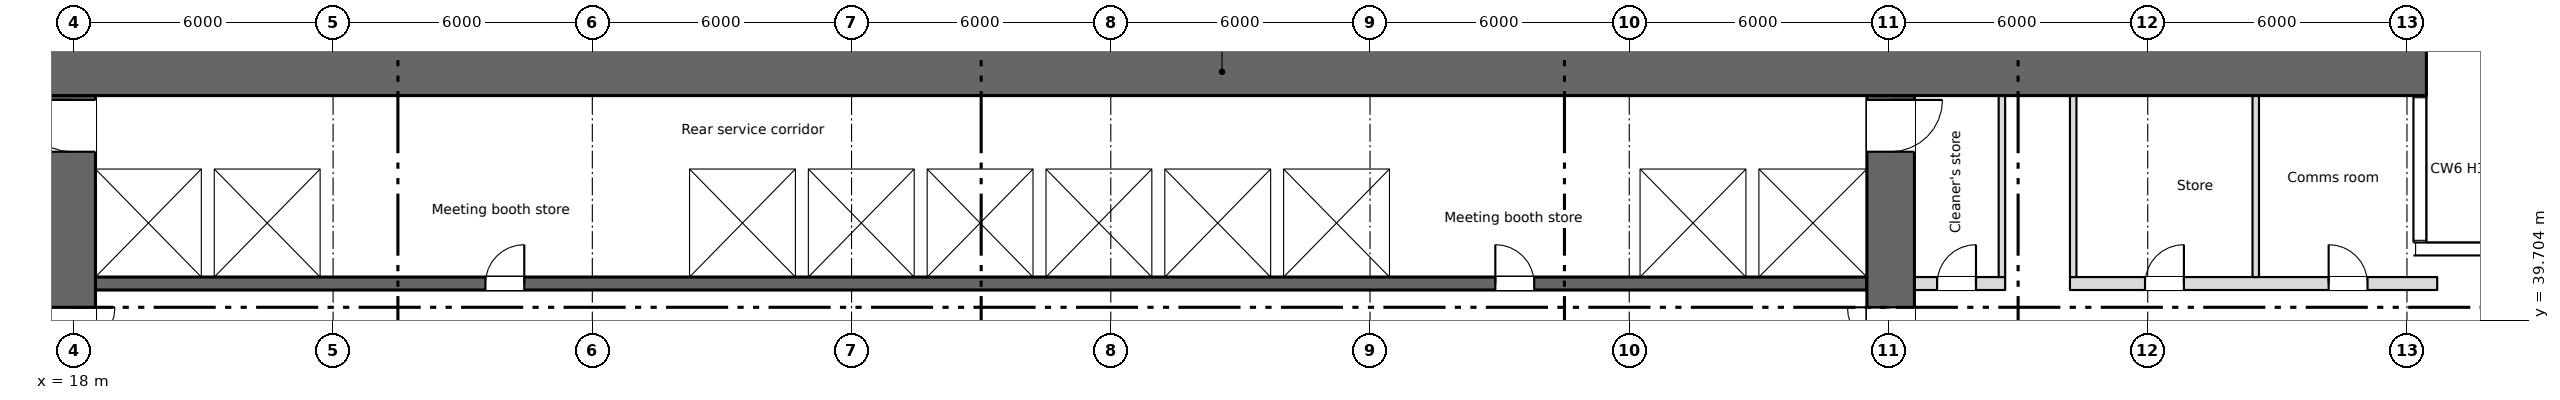
"""IFC4 building model, lengths in metres.
Left out: names, types, materials, properties, quantities, classifications, styles, units other than length and angle.
Written with IfcOpenShell. Run it as: python <this file> out.ifc"""

import sys

from ifc_helpers import new_model, si_unit, direction, frame, frame_2d, origin, place, context, subcontext, project, spatial, rectangle, extrude, element, fill, save


model = new_model("IFC4")
c1 = context("Model", 3, precision=1e-05, world=origin(), true_north=direction((0.0, 1.0)))
c2 = subcontext(c1, "Body", "Model", "MODEL_VIEW")
j1 = project(units=[si_unit("LENGTHUNIT", "METRE"), si_unit("PLANEANGLEUNIT", "RADIAN")], contexts=[c1])
p1 = place(None, origin())
s1 = spatial("IfcSite", under=j1, at=p1, CompositionType="ELEMENT")
p2 = place(p1, origin())
s2 = spatial("IfcBuilding", under=s1, at=p2, CompositionType="ELEMENT")
p3 = place(p2, frame((0.0, 0.0, 17.9)))
s3 = spatial("IfcBuildingStorey", under=s2, at=p3, CompositionType="ELEMENT", Elevation=17.9)
p4 = place(p3, frame((5.55, 45.45, 0.0), z_axis=(0.0, 0.0, 1.0), x_axis=(1.0, 0.0, 0.0)))
e1 = element("IfcWall", 1, at=p4, inside=s3, PredefinedType="SHEAR", context=c2, shape_type="SweptSolid", body=[
    extrude(rectangle(XDim=66.9, YDim=1.1, at=frame_2d((33.45, 0.0))), origin(), (0.0, 0.0, 1.0), 3.8),
])
p5 = place(p4, frame((1.2, 0.0, 0.6)))
e2 = element("IfcOpeningElement", 2, at=p5, cuts=e1, PredefinedType="OPENING", context=c2, shape_type="SweptSolid", body=[
    extrude(rectangle(XDim=0.6, YDim=2.7, at=frame_2d((0.3, 1.35))), frame((0.0, 0.56, 0.0), z_axis=(0.0, -1.0, 0.0), x_axis=(1.0, 0.0, 0.0)), (0.0, 0.0, 1.0), 1.12),
])
p6 = place(p4, frame((7.2, 0.0, 0.6)))
e3 = element("IfcOpeningElement", 3, at=p6, cuts=e1, PredefinedType="OPENING", context=c2, shape_type="SweptSolid", body=[
    extrude(rectangle(XDim=0.6, YDim=2.7, at=frame_2d((0.3, 1.35))), frame((0.0, 0.56, 0.0), z_axis=(0.0, -1.0, 0.0), x_axis=(1.0, 0.0, 0.0)), (0.0, 0.0, 1.0), 1.12),
])
p7 = place(p3, frame((72.85, 28.4, 0.0), z_axis=(0.0, 0.0, 1.0), x_axis=(0.0, 1.0, 0.0)))
e4 = element("IfcWall", 4, at=p7, inside=s3, PredefinedType="SHEAR", context=c2, shape_type="SweptSolid", body=[
    extrude(rectangle(XDim=12.85, YDim=0.3, at=frame_2d((6.425, 0.0))), origin(), (0.0, 0.0, 1.0), 3.8),
])
p8 = place(p3, frame((17.95, 28.4, 0.0), z_axis=(0.0, 0.0, 1.0), x_axis=(0.0, 1.0, 0.0)))
e5 = element("IfcWall", 5, at=p8, inside=s3, PredefinedType="SHEAR", context=c2, shape_type="SweptSolid", body=[
    extrude(rectangle(XDim=16.5, YDim=1.1, at=frame_2d((8.25, 0.0))), origin(), (0.0, 0.0, 1.0), 3.8),
])
p9 = place(p8, frame((9.6, 0.0, 0.0)))
e6 = element("IfcOpeningElement", 6, at=p9, cuts=e5, PredefinedType="OPENING", context=c2, shape_type="SweptSolid", body=[
    extrude(rectangle(XDim=2.0, YDim=2.1, at=frame_2d((1.0, 1.05))), frame((0.0, 0.56, 0.0), z_axis=(0.0, -1.0, 0.0), x_axis=(1.0, 0.0, 0.0)), (0.0, 0.0, 1.0), 1.12),
])
p10 = place(p8, frame((15.2, 0.0, 0.0)))
e7 = element("IfcOpeningElement", 7, at=p10, cuts=e5, PredefinedType="OPENING", context=c2, shape_type="SweptSolid", body=[
    extrude(rectangle(XDim=1.2, YDim=2.1, at=frame_2d((0.6, 1.05))), frame((0.0, 0.56, 0.0), z_axis=(0.0, -1.0, 0.0), x_axis=(1.0, 0.0, 0.0)), (0.0, 0.0, 1.0), 1.12),
])
p11 = place(p3, frame((60.05, 28.4, 0.0), z_axis=(0.0, 0.0, 1.0), x_axis=(0.0, 1.0, 0.0)))
e8 = element("IfcWall", 8, at=p11, inside=s3, PredefinedType="SHEAR", context=c2, shape_type="SweptSolid", body=[
    extrude(rectangle(XDim=16.5, YDim=1.1, at=frame_2d((8.25, 0.0))), origin(), (0.0, 0.0, 1.0), 3.8),
])
p12 = place(p11, frame((9.6, 0.0, 0.0)))
e9 = element("IfcOpeningElement", 9, at=p12, cuts=e8, PredefinedType="OPENING", context=c2, shape_type="SweptSolid", body=[
    extrude(rectangle(XDim=2.0, YDim=2.1, at=frame_2d((1.0, 1.05))), frame((0.0, 0.56, 0.0), z_axis=(0.0, -1.0, 0.0), x_axis=(1.0, 0.0, 0.0)), (0.0, 0.0, 1.0), 1.12),
])
p13 = place(p11, frame((15.2, 0.0, 0.0)))
e10 = element("IfcOpeningElement", 10, at=p13, cuts=e8, PredefinedType="OPENING", context=c2, shape_type="SweptSolid", body=[
    extrude(rectangle(XDim=1.2, YDim=2.1, at=frame_2d((0.6, 1.05))), frame((0.0, 0.56, 0.0), z_axis=(0.0, -1.0, 0.0), x_axis=(1.0, 0.0, 0.0)), (0.0, 0.0, 1.0), 1.12),
])
p14 = place(p3, frame((18.5, 40.55, 0.0), z_axis=(0.0, 0.0, 1.0), x_axis=(1.0, 0.0, 0.0)))
e11 = element("IfcWall", 11, at=p14, inside=s3, PredefinedType="SHEAR", context=c2, shape_type="SweptSolid", body=[
    extrude(rectangle(XDim=41.0, YDim=0.3, at=frame_2d((20.5, 0.0))), origin(), (0.0, 0.0, 1.0), 3.8),
])
p15 = place(p14, frame((9.025, 0.0, 0.0)))
e12 = element("IfcOpeningElement", 12, at=p15, cuts=e11, PredefinedType="OPENING", context=c2, shape_type="SweptSolid", body=[
    extrude(rectangle(XDim=0.9, YDim=2.1, at=frame_2d((0.45, 1.05))), frame((0.0, 0.16, 0.0), z_axis=(0.0, -1.0, 0.0), x_axis=(1.0, 0.0, 0.0)), (0.0, 0.0, 1.0), 0.32),
])
p16 = place(p14, frame((32.4, 0.0, 0.0)))
e13 = element("IfcOpeningElement", 13, at=p16, cuts=e11, PredefinedType="OPENING", context=c2, shape_type="SweptSolid", body=[
    extrude(rectangle(XDim=0.9, YDim=2.1, at=frame_2d((0.45, 1.05))), frame((0.0, 0.16, 0.0), z_axis=(0.0, -1.0, 0.0), x_axis=(1.0, 0.0, 0.0)), (0.0, 0.0, 1.0), 0.32),
])
p17 = place(p14, frame((14.425, 0.0, 0.0)))
e14 = element("IfcOpeningElement", 14, at=p17, cuts=e11, PredefinedType="OPENING", context=c2, shape_type="SweptSolid", body=[
    extrude(rectangle(XDim=1.1, YDim=2.1, at=frame_2d((0.55, 1.05))), frame((0.0, 0.16, 0.0), z_axis=(0.0, -1.0, 0.0), x_axis=(1.0, 0.0, 0.0)), (0.0, 0.0, 1.0), 0.32),
])
p18 = place(p14, frame((17.175, 0.0, 0.0)))
e15 = element("IfcOpeningElement", 15, at=p18, cuts=e11, PredefinedType="OPENING", context=c2, shape_type="SweptSolid", body=[
    extrude(rectangle(XDim=1.1, YDim=2.1, at=frame_2d((0.55, 1.05))), frame((0.0, 0.16, 0.0), z_axis=(0.0, -1.0, 0.0), x_axis=(1.0, 0.0, 0.0)), (0.0, 0.0, 1.0), 0.32),
])
p19 = place(p14, frame((19.925, 0.0, 0.0)))
e16 = element("IfcOpeningElement", 16, at=p19, cuts=e11, PredefinedType="OPENING", context=c2, shape_type="SweptSolid", body=[
    extrude(rectangle(XDim=1.1, YDim=2.1, at=frame_2d((0.55, 1.05))), frame((0.0, 0.16, 0.0), z_axis=(0.0, -1.0, 0.0), x_axis=(1.0, 0.0, 0.0)), (0.0, 0.0, 1.0), 0.32),
])
p20 = place(p14, frame((22.675, 0.0, 0.0)))
e17 = element("IfcOpeningElement", 17, at=p20, cuts=e11, PredefinedType="OPENING", context=c2, shape_type="SweptSolid", body=[
    extrude(rectangle(XDim=1.1, YDim=2.1, at=frame_2d((0.55, 1.05))), frame((0.0, 0.16, 0.0), z_axis=(0.0, -1.0, 0.0), x_axis=(1.0, 0.0, 0.0)), (0.0, 0.0, 1.0), 0.32),
])
p21 = place(p14, frame((36.375, 0.0, 0.0)))
e18 = element("IfcOpeningElement", 18, at=p21, cuts=e11, PredefinedType="OPENING", context=c2, shape_type="SweptSolid", body=[
    extrude(rectangle(XDim=1.2, YDim=2.1, at=frame_2d((0.6, 1.05))), frame((0.0, 0.16, 0.0), z_axis=(0.0, -1.0, 0.0), x_axis=(1.0, 0.0, 0.0)), (0.0, 0.0, 1.0), 0.32),
])
p22 = place(p14, frame((39.15, 0.0, 0.0)))
e19 = element("IfcOpeningElement", 19, at=p22, cuts=e11, PredefinedType="OPENING", context=c2, shape_type="SweptSolid", body=[
    extrude(rectangle(XDim=1.2, YDim=2.1, at=frame_2d((0.6, 1.05))), frame((0.0, 0.16, 0.0), z_axis=(0.0, -1.0, 0.0), x_axis=(1.0, 0.0, 0.0)), (0.0, 0.0, 1.0), 0.32),
])
p23 = place(p3, frame((18.5, 43.35, 0.0), z_axis=(0.0, 0.0, 1.0), x_axis=(1.0, 0.0, 0.0)))
e20 = element("IfcWall", 20, at=p23, inside=s3, PredefinedType="SHEAR", context=c2, shape_type="SweptSolid", body=[
    extrude(rectangle(XDim=41.0, YDim=0.3, at=frame_2d((20.5, 0.0))), origin(), (0.0, 0.0, 1.0), 3.8),
])
p24 = place(p3, frame((60.6, 40.55, 0.0), z_axis=(0.0, 0.0, 1.0), x_axis=(1.0, 0.0, 0.0)))
e21 = element("IfcWall", 21, at=p24, inside=s3, PredefinedType="PARTITIONING", context=c2, shape_type="SweptSolid", body=[
    extrude(rectangle(XDim=2.1, YDim=0.3, at=frame_2d((1.05, 0.0))), origin(), (0.0, 0.0, 1.0), 3.8),
])
p25 = place(p24, frame((0.525, 0.0, 0.0)))
e22 = element("IfcOpeningElement", 22, at=p25, cuts=e21, PredefinedType="OPENING", context=c2, shape_type="SweptSolid", body=[
    extrude(rectangle(XDim=0.9, YDim=2.1, at=frame_2d((0.45, 1.05))), frame((0.0, 0.16, 0.0), z_axis=(0.0, -1.0, 0.0), x_axis=(1.0, 0.0, 0.0)), (0.0, 0.0, 1.0), 0.32),
])
p26 = place(p3, frame((64.2, 40.55, 0.0), z_axis=(0.0, 0.0, 1.0), x_axis=(1.0, 0.0, 0.0)))
e23 = element("IfcWall", 23, at=p26, inside=s3, PredefinedType="PARTITIONING", context=c2, shape_type="SweptSolid", body=[
    extrude(rectangle(XDim=8.5, YDim=0.3, at=frame_2d((4.25, 0.0))), origin(), (0.0, 0.0, 1.0), 3.8),
])
p27 = place(p26, frame((1.738, 0.0, 0.0)))
e24 = element("IfcOpeningElement", 24, at=p27, cuts=e23, PredefinedType="OPENING", context=c2, shape_type="SweptSolid", body=[
    extrude(rectangle(XDim=0.9, YDim=2.1, at=frame_2d((0.45, 1.05))), frame((0.0, 0.16, 0.0), z_axis=(0.0, -1.0, 0.0), x_axis=(1.0, 0.0, 0.0)), (0.0, 0.0, 1.0), 0.32),
])
p28 = place(p26, frame((5.988, 0.0, 0.0)))
e25 = element("IfcOpeningElement", 25, at=p28, cuts=e23, PredefinedType="OPENING", context=c2, shape_type="SweptSolid", body=[
    extrude(rectangle(XDim=0.9, YDim=2.1, at=frame_2d((0.45, 1.05))), frame((0.0, 0.16, 0.0), z_axis=(0.0, -1.0, 0.0), x_axis=(1.0, 0.0, 0.0)), (0.0, 0.0, 1.0), 0.32),
])
for number, where, z_axis, x_axis in (
    (26, (21.1, 40.7, 0.0), (0.0, 0.0, 1.0), (0.0, 1.0, 0.0)),
    (27, (23.85, 40.7, 0.0), (0.0, 0.0, 1.0), (0.0, 1.0, 0.0)),
    (28, (32.1, 40.7, 0.0), (0.0, 0.0, 1.0), (0.0, 1.0, 0.0)),
    (29, (34.85, 40.7, 0.0), (0.0, 0.0, 1.0), (0.0, 1.0, 0.0)),
    (30, (37.6, 40.7, 0.0), (0.0, 0.0, 1.0), (0.0, 1.0, 0.0)),
    (31, (40.35, 40.7, 0.0), (0.0, 0.0, 1.0), (0.0, 1.0, 0.0)),
    (32, (43.1, 40.7, 0.0), (0.0, 0.0, 1.0), (0.0, 1.0, 0.0)),
    (33, (45.85, 40.7, 0.0), (0.0, 0.0, 1.0), (0.0, 1.0, 0.0)),
    (34, (48.6, 40.7, 0.0), (0.0, 0.0, 1.0), (0.0, 1.0, 0.0)),
    (35, (54.1, 40.7, 0.0), (0.0, 0.0, 1.0), (0.0, 1.0, 0.0)),
    (36, (56.85, 40.7, 0.0), (0.0, 0.0, 1.0), (0.0, 1.0, 0.0)),
):
    element("IfcWall", number, at=place(p3, frame(where, z_axis=z_axis, x_axis=x_axis)), inside=s3, PredefinedType="SHEAR", context=c2, shape_type="SweptSolid", body=[
        extrude(rectangle(XDim=2.5, YDim=0.3, at=frame_2d((1.25, 0.0))), origin(), (0.0, 0.0, 1.0), 3.8),
    ])
for number, where, z_axis, x_axis in (
    (37, (62.625, 40.7, 0.0), (0.0, 0.0, 1.0), (0.0, 1.0, 0.0)),
    (38, (64.275, 40.7, 0.0), (0.0, 0.0, 1.0), (0.0, 1.0, 0.0)),
    (39, (68.5, 40.7, 0.0), (0.0, 0.0, 1.0), (0.0, 1.0, 0.0)),
):
    element("IfcWall", number, at=place(p3, frame(where, z_axis=z_axis, x_axis=x_axis)), inside=s3, PredefinedType="PARTITIONING", context=c2, shape_type="SweptSolid", body=[
        extrude(rectangle(XDim=4.2, YDim=0.15, at=frame_2d((2.1, 0.0))), origin(), (0.0, 0.0, 1.0), 3.8),
    ])
p29 = place(p25, origin())
e40 = element("IfcDoor", 40, at=p29, inside=s3, OperationType="SINGLE_SWING_RIGHT", PredefinedType="DOOR", context=c2, shape_type="SweptSolid", body=[
    extrude(rectangle(XDim=0.9, YDim=2.1, at=frame_2d((0.45, 1.05))), frame((0.0, 0.025, 0.0), z_axis=(0.0, -1.0, 0.0), x_axis=(1.0, 0.0, 0.0)), (0.0, 0.0, 1.0), 0.05),
])
fill(e22, e40)
p30 = place(p27, origin())
e41 = element("IfcDoor", 41, at=p30, inside=s3, OperationType="SINGLE_SWING_RIGHT", PredefinedType="DOOR", context=c2, shape_type="SweptSolid", body=[
    extrude(rectangle(XDim=0.9, YDim=2.1, at=frame_2d((0.45, 1.05))), frame((0.0, 0.025, 0.0), z_axis=(0.0, -1.0, 0.0), x_axis=(1.0, 0.0, 0.0)), (0.0, 0.0, 1.0), 0.05),
])
fill(e24, e41)
p31 = place(p28, origin())
e42 = element("IfcDoor", 42, at=p31, inside=s3, OperationType="SINGLE_SWING_LEFT", PredefinedType="DOOR", context=c2, shape_type="SweptSolid", body=[
    extrude(rectangle(XDim=0.9, YDim=2.1, at=frame_2d((0.45, 1.05))), frame((0.0, 0.025, 0.0), z_axis=(0.0, -1.0, 0.0), x_axis=(1.0, 0.0, 0.0)), (0.0, 0.0, 1.0), 0.05),
])
fill(e25, e42)
p32 = place(p15, origin())
e43 = element("IfcDoor", 43, at=p32, inside=s3, OperationType="SINGLE_SWING_RIGHT", PredefinedType="DOOR", context=c2, shape_type="SweptSolid", body=[
    extrude(rectangle(XDim=0.9, YDim=2.1, at=frame_2d((0.45, 1.05))), frame((0.0, 0.025, 0.0), z_axis=(0.0, -1.0, 0.0), x_axis=(1.0, 0.0, 0.0)), (0.0, 0.0, 1.0), 0.05),
])
fill(e12, e43)
p33 = place(p16, origin())
e44 = element("IfcDoor", 44, at=p33, inside=s3, OperationType="SINGLE_SWING_LEFT", PredefinedType="DOOR", context=c2, shape_type="SweptSolid", body=[
    extrude(rectangle(XDim=0.9, YDim=2.1, at=frame_2d((0.45, 1.05))), frame((0.0, 0.025, 0.0), z_axis=(0.0, -1.0, 0.0), x_axis=(1.0, 0.0, 0.0)), (0.0, 0.0, 1.0), 0.05),
])
fill(e13, e44)
p34 = place(p17, origin())
e45 = element("IfcDoor", 45, at=p34, inside=s3, OperationType="SLIDING_TO_LEFT", PredefinedType="DOOR", context=c2, shape_type="SweptSolid", body=[
    extrude(rectangle(XDim=1.1, YDim=2.1, at=frame_2d((0.55, 1.05))), frame((0.0, 0.025, 0.0), z_axis=(0.0, -1.0, 0.0), x_axis=(1.0, 0.0, 0.0)), (0.0, 0.0, 1.0), 0.05),
])
fill(e14, e45)
p35 = place(p18, origin())
e46 = element("IfcDoor", 46, at=p35, inside=s3, OperationType="SLIDING_TO_LEFT", PredefinedType="DOOR", context=c2, shape_type="SweptSolid", body=[
    extrude(rectangle(XDim=1.1, YDim=2.1, at=frame_2d((0.55, 1.05))), frame((0.0, 0.025, 0.0), z_axis=(0.0, -1.0, 0.0), x_axis=(1.0, 0.0, 0.0)), (0.0, 0.0, 1.0), 0.05),
])
fill(e15, e46)
p36 = place(p19, origin())
e47 = element("IfcDoor", 47, at=p36, inside=s3, OperationType="SLIDING_TO_LEFT", PredefinedType="DOOR", context=c2, shape_type="SweptSolid", body=[
    extrude(rectangle(XDim=1.1, YDim=2.1, at=frame_2d((0.55, 1.05))), frame((0.0, 0.025, 0.0), z_axis=(0.0, -1.0, 0.0), x_axis=(1.0, 0.0, 0.0)), (0.0, 0.0, 1.0), 0.05),
])
fill(e16, e47)
p37 = place(p20, origin())
e48 = element("IfcDoor", 48, at=p37, inside=s3, OperationType="SLIDING_TO_LEFT", PredefinedType="DOOR", context=c2, shape_type="SweptSolid", body=[
    extrude(rectangle(XDim=1.1, YDim=2.1, at=frame_2d((0.55, 1.05))), frame((0.0, 0.025, 0.0), z_axis=(0.0, -1.0, 0.0), x_axis=(1.0, 0.0, 0.0)), (0.0, 0.0, 1.0), 0.05),
])
fill(e17, e48)
p38 = place(p21, origin())
e49 = element("IfcDoor", 49, at=p38, inside=s3, OperationType="SLIDING_TO_LEFT", PredefinedType="DOOR", context=c2, shape_type="SweptSolid", body=[
    extrude(rectangle(XDim=1.2, YDim=2.1, at=frame_2d((0.6, 1.05))), frame((0.0, 0.025, 0.0), z_axis=(0.0, -1.0, 0.0), x_axis=(1.0, 0.0, 0.0)), (0.0, 0.0, 1.0), 0.05),
])
fill(e18, e49)
p39 = place(p22, origin())
e50 = element("IfcDoor", 50, at=p39, inside=s3, OperationType="SLIDING_TO_LEFT", PredefinedType="DOOR", context=c2, shape_type="SweptSolid", body=[
    extrude(rectangle(XDim=1.2, YDim=2.1, at=frame_2d((0.6, 1.05))), frame((0.0, 0.025, 0.0), z_axis=(0.0, -1.0, 0.0), x_axis=(1.0, 0.0, 0.0)), (0.0, 0.0, 1.0), 0.05),
])
fill(e19, e50)
p40 = place(p9, origin())
e51 = element("IfcDoor", 51, at=p40, inside=s3, OperationType="DOUBLE_DOOR_SINGLE_SWING", PredefinedType="DOOR", context=c2, shape_type="SweptSolid", body=[
    extrude(rectangle(XDim=2.0, YDim=2.1, at=frame_2d((1.0, 1.05))), frame((0.0, 0.025, 0.0), z_axis=(0.0, -1.0, 0.0), x_axis=(1.0, 0.0, 0.0)), (0.0, 0.0, 1.0), 0.05),
])
fill(e6, e51)
p41 = place(p12, origin())
e52 = element("IfcDoor", 52, at=p41, inside=s3, OperationType="DOUBLE_DOOR_SINGLE_SWING", PredefinedType="DOOR", context=c2, shape_type="SweptSolid", body=[
    extrude(rectangle(XDim=2.0, YDim=2.1, at=frame_2d((1.0, 1.05))), frame((0.0, 0.025, 0.0), z_axis=(0.0, -1.0, 0.0), x_axis=(1.0, 0.0, 0.0)), (0.0, 0.0, 1.0), 0.05),
])
fill(e9, e52)
p42 = place(p10, origin())
e53 = element("IfcDoor", 53, at=p42, inside=s3, OperationType="SINGLE_SWING_RIGHT", PredefinedType="DOOR", context=c2, shape_type="SweptSolid", body=[
    extrude(rectangle(XDim=1.2, YDim=2.1, at=frame_2d((0.6, 1.05))), frame((0.0, 0.025, 0.0), z_axis=(0.0, -1.0, 0.0), x_axis=(1.0, 0.0, 0.0)), (0.0, 0.0, 1.0), 0.05),
])
fill(e7, e53)
p43 = place(p13, origin())
e54 = element("IfcDoor", 54, at=p43, inside=s3, OperationType="SINGLE_SWING_RIGHT", PredefinedType="DOOR", context=c2, shape_type="SweptSolid", body=[
    extrude(rectangle(XDim=1.2, YDim=2.1, at=frame_2d((0.6, 1.05))), frame((0.0, 0.025, 0.0), z_axis=(0.0, -1.0, 0.0), x_axis=(1.0, 0.0, 0.0)), (0.0, 0.0, 1.0), 0.05),
])
fill(e10, e54)
save(model, sys.argv[1])
